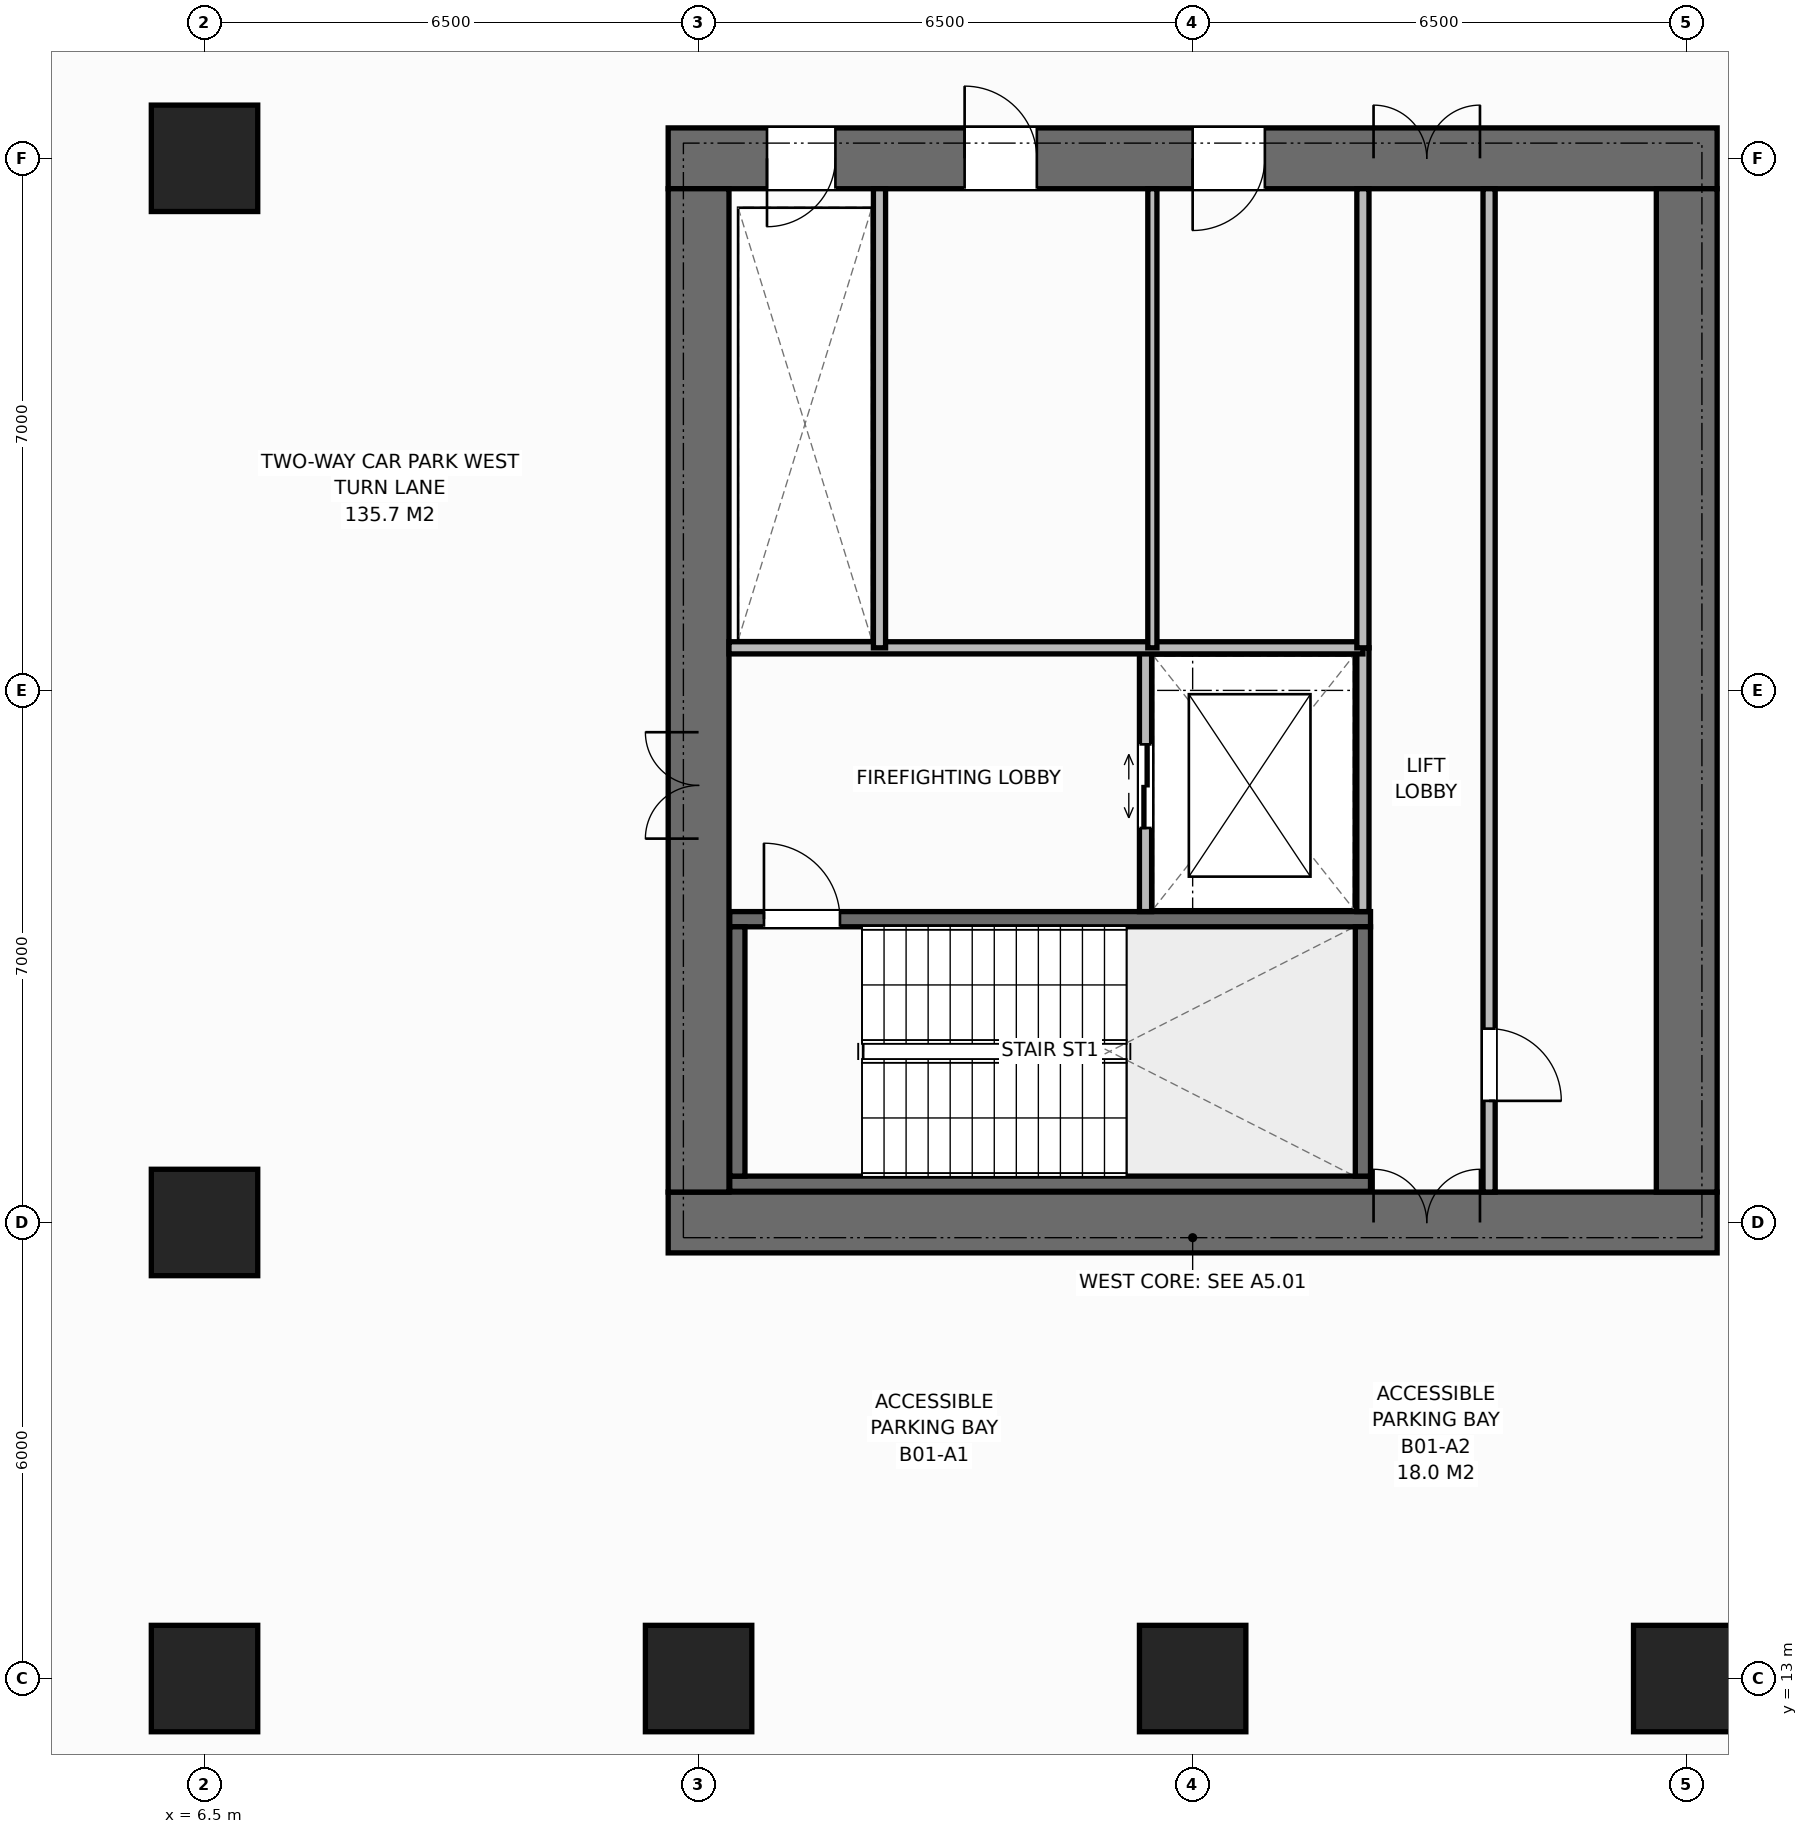
"""IFC4 building model, lengths in metres.
Left out: names, types, materials, properties, quantities, classifications, styles, units other than length and angle.
Written with IfcOpenShell. Run it as: python <this file> out.ifc"""

import sys

from ifc_helpers import new_model, si_unit, direction, frame, frame_2d, origin, origin_2d, place, context, subcontext, project, spatial, rectangle, extrude, element, fill, save


model = new_model("IFC4")
c1 = context("Model", 3, precision=1e-05, world=origin(), true_north=direction((0.0, 1.0)))
c2 = subcontext(c1, "Body", "Model", "MODEL_VIEW")
j1 = project(units=[si_unit("LENGTHUNIT", "METRE"), si_unit("PLANEANGLEUNIT", "RADIAN")], contexts=[c1])
p1 = place(None, origin())
s1 = spatial("IfcSite", under=j1, at=p1, CompositionType="ELEMENT")
p2 = place(p1, origin())
s2 = spatial("IfcBuilding", under=s1, at=p2, CompositionType="ELEMENT")
p3 = place(p2, frame((0.0, 0.0, -4.5)))
s3 = spatial("IfcBuildingStorey", under=s2, at=p3, CompositionType="ELEMENT", Elevation=-4.5)
p4 = place(p3, frame((12.6, 19.0, 0.0), z_axis=(0.0, 0.0, 1.0), x_axis=(1.0, 0.0, 0.0)))
e1 = element("IfcWall", 1, at=p4, inside=s3, PredefinedType="SHEAR", context=c2, shape_type="SweptSolid", body=[
    extrude(rectangle(XDim=13.8, YDim=0.8, at=frame_2d((6.9, 0.0))), origin(), (0.0, 0.0, 1.0), 4.5),
])
p5 = place(p4, frame((9.28, 0.0, 0.0)))
e2 = element("IfcOpeningElement", 2, at=p5, cuts=e1, PredefinedType="OPENING", context=c2, shape_type="SweptSolid", body=[
    extrude(rectangle(XDim=1.4, YDim=2.2, at=frame_2d((0.7, 1.1))), frame((0.0, 0.41, 0.0), z_axis=(0.0, -1.0, 0.0), x_axis=(1.0, 0.0, 0.0)), (0.0, 0.0, 1.0), 0.82),
])
p6 = place(p3, frame((12.6, 33.0, 0.0), z_axis=(0.0, 0.0, 1.0), x_axis=(1.0, 0.0, 0.0)))
e3 = element("IfcWall", 3, at=p6, inside=s3, PredefinedType="SHEAR", context=c2, shape_type="SweptSolid", body=[
    extrude(rectangle(XDim=13.8, YDim=0.8, at=frame_2d((6.9, 0.0))), origin(), (0.0, 0.0, 1.0), 4.5),
])
p7 = place(p6, frame((1.3, 0.0, 0.0)))
e4 = element("IfcOpeningElement", 4, at=p7, cuts=e3, PredefinedType="OPENING", context=c2, shape_type="SweptSolid", body=[
    extrude(rectangle(XDim=0.9, YDim=2.15, at=frame_2d((0.45, 1.075))), frame((0.0, 0.41, 0.0), z_axis=(0.0, -1.0, 0.0), x_axis=(1.0, 0.0, 0.0)), (0.0, 0.0, 1.0), 0.82),
])
p8 = place(p6, frame((3.9, 0.0, 0.0)))
e5 = element("IfcOpeningElement", 5, at=p8, cuts=e3, PredefinedType="OPENING", context=c2, shape_type="SweptSolid", body=[
    extrude(rectangle(XDim=0.95, YDim=2.15, at=frame_2d((0.475, 1.075))), frame((0.0, 0.41, 0.0), z_axis=(0.0, -1.0, 0.0), x_axis=(1.0, 0.0, 0.0)), (0.0, 0.0, 1.0), 0.82),
])
p9 = place(p6, frame((6.9, 0.0, 0.0)))
e6 = element("IfcOpeningElement", 6, at=p9, cuts=e3, PredefinedType="OPENING", context=c2, shape_type="SweptSolid", body=[
    extrude(rectangle(XDim=0.95, YDim=2.15, at=frame_2d((0.475, 1.075))), frame((0.0, 0.41, 0.0), z_axis=(0.0, -1.0, 0.0), x_axis=(1.0, 0.0, 0.0)), (0.0, 0.0, 1.0), 0.82),
])
p10 = place(p6, frame((9.28, 0.0, 0.0)))
e7 = element("IfcOpeningElement", 7, at=p10, cuts=e3, PredefinedType="OPENING", context=c2, shape_type="SweptSolid", body=[
    extrude(rectangle(XDim=1.4, YDim=2.2, at=frame_2d((0.7, 1.1))), frame((0.0, 0.41, 0.0), z_axis=(0.0, -1.0, 0.0), x_axis=(1.0, 0.0, 0.0)), (0.0, 0.0, 1.0), 0.82),
])
p11 = place(p3, frame((13.0, 19.4, 0.0), z_axis=(0.0, 0.0, 1.0), x_axis=(0.0, 1.0, 0.0)))
e8 = element("IfcWall", 8, at=p11, inside=s3, PredefinedType="SHEAR", context=c2, shape_type="SweptSolid", body=[
    extrude(rectangle(XDim=13.2, YDim=0.8, at=frame_2d((6.6, 0.0))), origin(), (0.0, 0.0, 1.0), 4.5),
])
p12 = place(p11, frame((4.65, 0.0, 0.0)))
e9 = element("IfcOpeningElement", 9, at=p12, cuts=e8, PredefinedType="OPENING", context=c2, shape_type="SweptSolid", body=[
    extrude(rectangle(XDim=1.4, YDim=2.2, at=frame_2d((0.7, 1.1))), frame((0.0, 0.41, 0.0), z_axis=(0.0, -1.0, 0.0), x_axis=(1.0, 0.0, 0.0)), (0.0, 0.0, 1.0), 0.82),
])
p13 = place(p3, frame((26.0, 19.4, 0.0), z_axis=(0.0, 0.0, 1.0), x_axis=(0.0, 1.0, 0.0)))
e10 = element("IfcWall", 10, at=p13, inside=s3, PredefinedType="SHEAR", context=c2, shape_type="SweptSolid", body=[
    extrude(rectangle(XDim=13.2, YDim=0.8, at=frame_2d((6.6, 0.0))), origin(), (0.0, 0.0, 1.0), 4.5),
])
p14 = place(p3, frame((13.41, 19.51, 0.0), z_axis=(0.0, 0.0, 1.0), x_axis=(1.0, 0.0, 0.0)))
e11 = element("IfcWall", 11, at=p14, inside=s3, PredefinedType="SHEAR", context=c2, shape_type="SweptSolid", body=[
    extrude(rectangle(XDim=8.43, YDim=0.2, at=frame_2d((4.215, 0.0))), origin(), (0.0, 0.0, 1.0), 4.5),
])
p15 = place(p3, frame((13.41, 22.99, 0.0), z_axis=(0.0, 0.0, 1.0), x_axis=(1.0, 0.0, 0.0)))
e12 = element("IfcWall", 12, at=p15, inside=s3, PredefinedType="SHEAR", context=c2, shape_type="SweptSolid", body=[
    extrude(rectangle(XDim=8.43, YDim=0.2, at=frame_2d((4.215, 0.0))), origin(), (0.0, 0.0, 1.0), 4.5),
])
p16 = place(p15, frame((0.45, 0.0, 0.0)))
e13 = element("IfcOpeningElement", 13, at=p16, cuts=e12, PredefinedType="OPENING", context=c2, shape_type="SweptSolid", body=[
    extrude(rectangle(XDim=1.0, YDim=2.15, at=frame_2d((0.5, 1.075))), frame((0.0, 0.11, 0.0), z_axis=(0.0, -1.0, 0.0), x_axis=(1.0, 0.0, 0.0)), (0.0, 0.0, 1.0), 0.22),
])
for number, where, z_axis, x_axis in (
    (14, (13.51, 19.61, 0.0), (0.0, 0.0, 1.0), (0.0, 1.0, 0.0)),
    (15, (21.74, 19.61, 0.0), (0.0, 0.0, 1.0), (0.0, 1.0, 0.0)),
):
    element("IfcWall", number, at=place(p3, frame(where, z_axis=z_axis, x_axis=x_axis)), inside=s3, PredefinedType="SHEAR", context=c2, shape_type="SweptSolid", body=[
        extrude(rectangle(XDim=3.28, YDim=0.2, at=frame_2d((1.64, 0.0))), origin(), (0.0, 0.0, 1.0), 4.5),
    ])
for number, where, z_axis, x_axis in (
    (16, (6.5, 19.0, 0.0), (0.0, 0.0, 1.0), (1.0, 0.0, 0.0)),
    (17, (6.5, 33.0, 0.0), (0.0, 0.0, 1.0), (1.0, 0.0, 0.0)),
    (18, (6.5, 13.0, 0.0), (0.0, 0.0, 1.0), (1.0, 0.0, 0.0)),
    (19, (13.0, 13.0, 0.0), (0.0, 0.0, 1.0), (1.0, 0.0, 0.0)),
    (20, (19.5, 13.0, 0.0), (0.0, 0.0, 1.0), (1.0, 0.0, 0.0)),
    (21, (26.0, 13.0, 0.0), (0.0, 0.0, 1.0), (1.0, 0.0, 0.0)),
):
    element("IfcColumn", number, at=place(p3, frame(where, z_axis=z_axis, x_axis=x_axis)), inside=s3, PredefinedType="COLUMN", context=c2, shape_type="SweptSolid", body=[
        extrude(rectangle(XDim=1.4, YDim=1.4, at=origin_2d()), origin(), (0.0, 0.0, 1.0), 4.5),
    ])
p17 = place(p3, frame((21.74, 23.09, 0.0), z_axis=(0.0, 0.0, 1.0), x_axis=(0.0, 1.0, 0.0)))
e22 = element("IfcWall", 22, at=p17, inside=s3, PredefinedType="STANDARD", context=c2, shape_type="SweptSolid", body=[
    extrude(rectangle(XDim=3.47, YDim=0.16, at=frame_2d((1.735, 0.0))), origin(), (0.0, 0.0, 1.0), 4.22),
])
p18 = place(p3, frame((18.88, 23.09, 0.0), z_axis=(0.0, 0.0, 1.0), x_axis=(0.0, 1.0, 0.0)))
e23 = element("IfcWall", 23, at=p18, inside=s3, PredefinedType="STANDARD", context=c2, shape_type="SweptSolid", body=[
    extrude(rectangle(XDim=3.47, YDim=0.16, at=frame_2d((1.735, 0.0))), origin(), (0.0, 0.0, 1.0), 4.22),
])
p19 = place(p18, frame((1.1, 0.0, 0.0)))
e24 = element("IfcOpeningElement", 24, at=p19, cuts=e23, PredefinedType="OPENING", context=c2, shape_type="SweptSolid", body=[
    extrude(rectangle(XDim=1.1, YDim=2.2, at=frame_2d((0.55, 1.1))), frame((0.0, 0.09, 0.0), z_axis=(0.0, -1.0, 0.0), x_axis=(1.0, 0.0, 0.0)), (0.0, 0.0, 1.0), 0.18),
])
p20 = place(p3, frame((13.4, 26.56, 0.0), z_axis=(0.0, 0.0, 1.0), x_axis=(1.0, 0.0, 0.0)))
e25 = element("IfcWall", 25, at=p20, inside=s3, PredefinedType="STANDARD", context=c2, shape_type="SweptSolid", body=[
    extrude(rectangle(XDim=8.34, YDim=0.16, at=frame_2d((4.17, 0.0))), origin(), (0.0, 0.0, 1.0), 4.22),
])
p21 = place(p3, frame((15.38, 26.56, 0.0), z_axis=(0.0, 0.0, 1.0), x_axis=(0.0, 1.0, 0.0)))
e26 = element("IfcWall", 26, at=p21, inside=s3, PredefinedType="STANDARD", context=c2, shape_type="SweptSolid", body=[
    extrude(rectangle(XDim=6.04, YDim=0.16, at=frame_2d((3.02, 0.0))), origin(), (0.0, 0.0, 1.0), 4.22),
])
p22 = place(p3, frame((18.97, 26.56, 0.0), z_axis=(0.0, 0.0, 1.0), x_axis=(0.0, 1.0, 0.0)))
e27 = element("IfcWall", 27, at=p22, inside=s3, PredefinedType="PARTITIONING", context=c2, shape_type="SweptSolid", body=[
    extrude(rectangle(XDim=6.04, YDim=0.12, at=frame_2d((3.02, 0.0))), origin(), (0.0, 0.0, 1.0), 4.22),
])
p23 = place(p3, frame((21.74, 26.56, 0.0), z_axis=(0.0, 0.0, 1.0), x_axis=(0.0, 1.0, 0.0)))
e28 = element("IfcWall", 28, at=p23, inside=s3, PredefinedType="STANDARD", context=c2, shape_type="SweptSolid", body=[
    extrude(rectangle(XDim=6.04, YDim=0.16, at=frame_2d((3.02, 0.0))), origin(), (0.0, 0.0, 1.0), 4.22),
])
p24 = place(p3, frame((23.4, 19.4, 0.0), z_axis=(0.0, 0.0, 1.0), x_axis=(0.0, 1.0, 0.0)))
e29 = element("IfcWall", 29, at=p24, inside=s3, PredefinedType="STANDARD", context=c2, shape_type="SweptSolid", body=[
    extrude(rectangle(XDim=13.2, YDim=0.16, at=frame_2d((6.6, 0.0))), origin(), (0.0, 0.0, 1.0), 4.22),
])
p25 = place(p24, frame((1.2, 0.0, 0.0)))
e30 = element("IfcOpeningElement", 30, at=p25, cuts=e29, PredefinedType="OPENING", context=c2, shape_type="SweptSolid", body=[
    extrude(rectangle(XDim=0.95, YDim=2.15, at=frame_2d((0.475, 1.075))), frame((0.0, 0.09, 0.0), z_axis=(0.0, -1.0, 0.0), x_axis=(1.0, 0.0, 0.0)), (0.0, 0.0, 1.0), 0.18),
])
p26 = place(p16, origin())
e31 = element("IfcDoor", 31, at=p26, inside=s3, OperationType="SINGLE_SWING_LEFT", PredefinedType="DOOR", context=c2, shape_type="SweptSolid", body=[
    extrude(rectangle(XDim=1.0, YDim=2.15, at=frame_2d((0.5, 1.075))), frame((0.0, 0.025, 0.0), z_axis=(0.0, -1.0, 0.0), x_axis=(1.0, 0.0, 0.0)), (0.0, 0.0, 1.0), 0.05),
])
fill(e13, e31)
p27 = place(p12, origin())
e32 = element("IfcDoor", 32, at=p27, inside=s3, OperationType="DOUBLE_DOOR_SINGLE_SWING", PredefinedType="DOOR", context=c2, shape_type="SweptSolid", body=[
    extrude(rectangle(XDim=1.4, YDim=2.2, at=frame_2d((0.7, 1.1))), frame((0.0, 0.025, 0.0), z_axis=(0.0, -1.0, 0.0), x_axis=(1.0, 0.0, 0.0)), (0.0, 0.0, 1.0), 0.05),
])
fill(e9, e32)
p28 = place(p19, origin())
e33 = element("IfcDoor", 33, at=p28, inside=s3, OperationType="DOUBLE_DOOR_SLIDING", PredefinedType="DOOR", context=c2, shape_type="SweptSolid", body=[
    extrude(rectangle(XDim=1.1, YDim=2.2, at=frame_2d((0.55, 1.1))), frame((0.0, 0.025, 0.0), z_axis=(0.0, -1.0, 0.0), x_axis=(1.0, 0.0, 0.0)), (0.0, 0.0, 1.0), 0.05),
])
fill(e24, e33)
p29 = place(p7, origin())
e34 = element("IfcDoor", 34, at=p29, inside=s3, OperationType="SINGLE_SWING_RIGHT", PredefinedType="DOOR", context=c2, shape_type="SweptSolid", body=[
    extrude(rectangle(XDim=0.9, YDim=2.15, at=frame_2d((0.45, 1.075))), frame((0.0, -0.075, 0.0), z_axis=(0.0, -1.0, 0.0), x_axis=(1.0, 0.0, 0.0)), (0.0, 0.0, 1.0), 0.05),
])
fill(e4, e34)
p30 = place(p8, origin())
e35 = element("IfcDoor", 35, at=p30, inside=s3, OperationType="SINGLE_SWING_LEFT", PredefinedType="DOOR", context=c2, shape_type="SweptSolid", body=[
    extrude(rectangle(XDim=0.95, YDim=2.15, at=frame_2d((0.475, 1.075))), frame((0.0, -0.075, 0.0), z_axis=(0.0, -1.0, 0.0), x_axis=(1.0, 0.0, 0.0)), (0.0, 0.0, 1.0), 0.05),
])
fill(e5, e35)
p31 = place(p9, origin())
e36 = element("IfcDoor", 36, at=p31, inside=s3, OperationType="SINGLE_SWING_RIGHT", PredefinedType="DOOR", context=c2, shape_type="SweptSolid", body=[
    extrude(rectangle(XDim=0.95, YDim=2.15, at=frame_2d((0.475, 1.075))), frame((0.0, -0.075, 0.0), z_axis=(0.0, -1.0, 0.0), x_axis=(1.0, 0.0, 0.0)), (0.0, 0.0, 1.0), 0.05),
])
fill(e6, e36)
p32 = place(p5, origin())
e37 = element("IfcDoor", 37, at=p32, inside=s3, OperationType="DOUBLE_DOOR_SINGLE_SWING", PredefinedType="DOOR", context=c2, shape_type="SweptSolid", body=[
    extrude(rectangle(XDim=1.4, YDim=2.2, at=frame_2d((0.7, 1.1))), frame((0.0, 0.125, 0.0), z_axis=(0.0, -1.0, 0.0), x_axis=(1.0, 0.0, 0.0)), (0.0, 0.0, 1.0), 0.05),
])
fill(e2, e37)
p33 = place(p10, origin())
e38 = element("IfcDoor", 38, at=p33, inside=s3, OperationType="DOUBLE_DOOR_SINGLE_SWING", PredefinedType="DOOR", context=c2, shape_type="SweptSolid", body=[
    extrude(rectangle(XDim=1.4, YDim=2.2, at=frame_2d((0.7, 1.1))), frame((0.0, -0.075, 0.0), z_axis=(0.0, -1.0, 0.0), x_axis=(1.0, 0.0, 0.0)), (0.0, 0.0, 1.0), 0.05),
])
fill(e7, e38)
p34 = place(p25, origin())
e39 = element("IfcDoor", 39, at=p34, inside=s3, OperationType="SINGLE_SWING_RIGHT", PredefinedType="DOOR", context=c2, shape_type="SweptSolid", body=[
    extrude(rectangle(XDim=0.95, YDim=2.15, at=frame_2d((0.475, 1.075))), frame((0.0, 0.025, 0.0), z_axis=(0.0, -1.0, 0.0), x_axis=(1.0, 0.0, 0.0)), (0.0, 0.0, 1.0), 0.05),
])
fill(e30, e39)
save(model, sys.argv[1])
